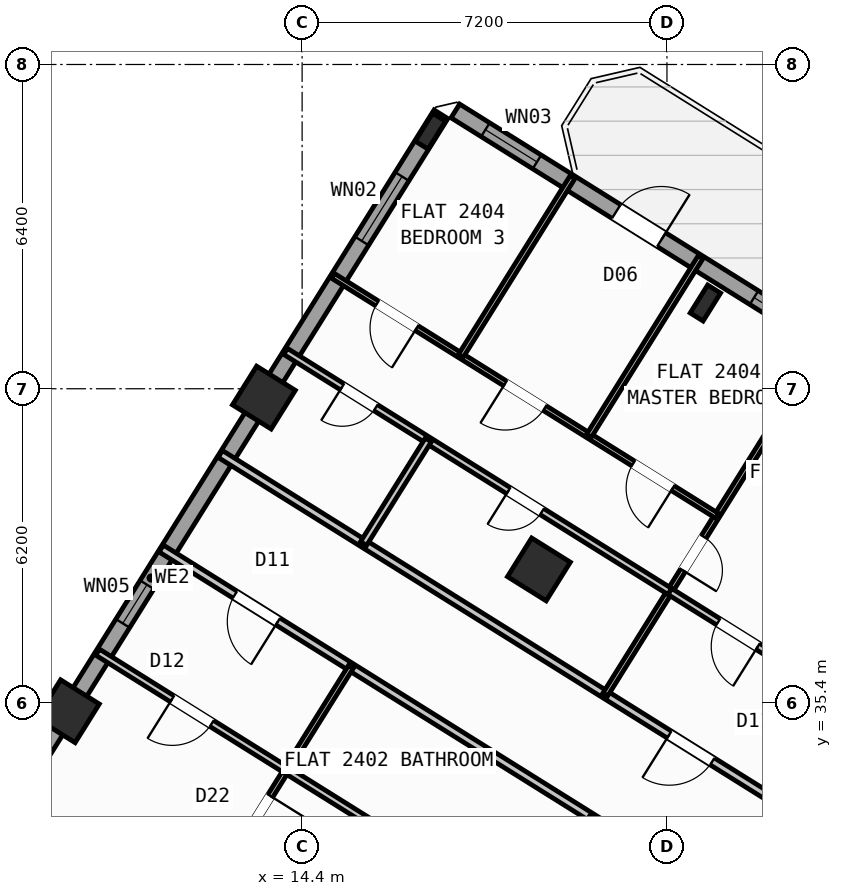
"""IFC4 building model, lengths in metres.
Left out: names, types, materials, properties, quantities, classifications, styles, units other than length and angle.
Written with IfcOpenShell. Run it as: python <this file> out.ifc"""

import sys

from ifc_helpers import new_model, si_unit, direction, frame, frame_2d, origin, origin_2d, place, context, subcontext, project, spatial, rectangle, hollow_rectangle, i_section, extrude, source, transform, mapped, element, fill, save


model = new_model("IFC4")
c1 = context("Model", 3, precision=1e-05, world=origin(), true_north=direction((0.0, 1.0)))
c2 = subcontext(c1, "Body", "Model", "MODEL_VIEW")
j1 = project(units=[si_unit("LENGTHUNIT", "METRE"), si_unit("PLANEANGLEUNIT", "RADIAN")], contexts=[c1])
p1 = place(None, origin())
s1 = spatial("IfcSite", under=j1, at=p1, CompositionType="ELEMENT")
p2 = place(p1, origin())
s2 = spatial("IfcBuilding", under=s1, at=p2, CompositionType="ELEMENT")
p3 = place(p2, frame((0.0, 0.0, 97.2)))
s3 = spatial("IfcBuildingStorey", under=s2, at=p3, CompositionType="ELEMENT", Elevation=97.2)
m1 = source(origin(), c2, "Body", "SweptSolid", [
    extrude(i_section(OverallWidth=0.3, OverallDepth=0.65, WebThickness=0.016, FlangeThickness=0.031, at=origin_2d()), origin(), (0.0, 0.0, 1.0), 3.6),
])
p4 = place(p3, frame((22.358, 43.292, 0.0), z_axis=(0.0, 0.0, 1.0), x_axis=(-0.848048096156, 0.529919264233, 0.0)))
e1 = element("IfcColumn", 1, at=p4, inside=s3, PredefinedType="COLUMN", context=c2, shape_type="MappedRepresentation", body=[
    mapped(m1, transform((0.0, 0.0, 0.0), scale=1.0)),
])
m2 = source(origin(), c2, "Body", "SweptSolid", [
    extrude(hollow_rectangle(XDim=0.9, YDim=0.9, WallThickness=0.036, at=origin_2d()), origin(), (0.0, 0.0, 1.0), 3.6),
])
p5 = place(p3, frame((19.073, 38.034, 0.0), z_axis=(0.0, 0.0, 1.0), x_axis=(-0.848048096156, 0.529919264233, 0.0)))
e2 = element("IfcColumn", 2, at=p5, inside=s3, PredefinedType="COLUMN", context=c2, shape_type="MappedRepresentation", body=[
    mapped(m2, transform((0.0, 0.0, 0.0), scale=1.0)),
])
p6 = place(p3, frame((16.931, 46.684, 0.0), z_axis=(0.0, 0.0, 1.0), x_axis=(-0.848048096156, 0.529919264233, 0.0)))
e3 = element("IfcColumn", 3, at=p6, inside=s3, PredefinedType="COLUMN", context=c2, shape_type="MappedRepresentation", body=[
    mapped(m1, transform((0.0, 0.0, 0.0), scale=1.0)),
])
for number, where, z_axis, x_axis in (
    (4, (13.646, 41.426, 0.0), (0.0, 0.0, 1.0), (-0.848, 0.53, 0.0)),
    (5, (9.777, 35.235, 0.0), (0.0, 0.0, 1.0), (-0.848, 0.53, 0.0)),
):
    element("IfcColumn", number, at=place(p3, frame(where, z_axis=z_axis, x_axis=x_axis)), inside=s3, PredefinedType="COLUMN", context=c2, shape_type="MappedRepresentation", body=[
        mapped(m2, transform((0.0, 0.0, 0.0), scale=1.0)),
    ])
p7 = place(p3, frame((5.7, 28.71, 0.0), z_axis=(0.0, 0.0, 1.0), x_axis=(0.529923711467, 0.8480453172, 0.0)))
e6 = element("IfcWall", 6, at=p7, inside=s3, PredefinedType="STANDARD", context=c2, shape_type="SweptSolid", body=[
    extrude(rectangle(XDim=21.587, YDim=0.32, at=frame_2d((10.794, 0.0))), origin(), (0.0, 0.0, 1.0), 2.745),
])
p8 = place(p7, frame((2.994, 0.0, 0.8)))
e7 = element("IfcOpeningElement", 7, at=p8, cuts=e6, PredefinedType="OPENING", context=c2, shape_type="SweptSolid", body=[
    extrude(rectangle(XDim=2.1, YDim=1.55, at=frame_2d((1.05, 0.775))), frame((0.0, 0.17, 0.0), z_axis=(0.0, -1.0, 0.0), x_axis=(1.0, 0.0, 0.0)), (0.0, 0.0, 1.0), 0.34),
])
p9 = place(p7, frame((9.739, 0.0, 1.0)))
e8 = element("IfcOpeningElement", 8, at=p9, cuts=e6, PredefinedType="OPENING", context=c2, shape_type="SweptSolid", body=[
    extrude(rectangle(XDim=0.9, YDim=1.25, at=frame_2d((0.45, 0.625))), frame((0.0, 0.17, 0.0), z_axis=(0.0, -1.0, 0.0), x_axis=(1.0, 0.0, 0.0)), (0.0, 0.0, 1.0), 0.34),
])
p10 = place(p7, frame((18.639, 0.0, 0.85)))
e9 = element("IfcOpeningElement", 9, at=p10, cuts=e6, PredefinedType="OPENING", context=c2, shape_type="SweptSolid", body=[
    extrude(rectangle(XDim=1.5, YDim=1.5, at=frame_2d((0.75, 0.75))), frame((0.0, 0.17, 0.0), z_axis=(0.0, -1.0, 0.0), x_axis=(1.0, 0.0, 0.0)), (0.0, 0.0, 1.0), 0.34),
])
p11 = place(p3, frame((17.424, 47.083, 0.0), z_axis=(0.0, 0.0, 1.0), x_axis=(0.848049927979, -0.529916332693, 0.0)))
e10 = element("IfcWall", 10, at=p11, inside=s3, PredefinedType="STANDARD", context=c2, shape_type="SweptSolid", body=[
    extrude(rectangle(XDim=29.223, YDim=0.32, at=frame_2d((14.612, 0.0))), origin(), (0.0, 0.0, 1.0), 3.32),
])
p12 = place(p11, frame((3.745, 0.0, 0.0)))
e11 = element("IfcOpeningElement", 11, at=p12, cuts=e10, PredefinedType="OPENING", context=c2, shape_type="SweptSolid", body=[
    extrude(rectangle(XDim=1.05, YDim=2.15, at=frame_2d((0.525, 1.075))), frame((0.0, 0.17, 0.0), z_axis=(0.0, -1.0, 0.0), x_axis=(1.0, 0.0, 0.0)), (0.0, 0.0, 1.0), 0.34),
])
p13 = place(p11, frame((0.699, 0.0, 0.95)))
e12 = element("IfcOpeningElement", 12, at=p13, cuts=e10, PredefinedType="OPENING", context=c2, shape_type="SweptSolid", body=[
    extrude(rectangle(XDim=1.2, YDim=1.4, at=frame_2d((0.6, 0.7))), frame((0.0, 0.17, 0.0), z_axis=(0.0, -1.0, 0.0), x_axis=(1.0, 0.0, 0.0)), (0.0, 0.0, 1.0), 0.34),
])
p14 = place(p11, frame((6.951, 0.0, 1.0)))
e13 = element("IfcOpeningElement", 13, at=p14, cuts=e10, PredefinedType="OPENING", context=c2, shape_type="SweptSolid", body=[
    extrude(rectangle(XDim=0.9, YDim=1.25, at=frame_2d((0.45, 0.625))), frame((0.0, 0.17, 0.0), z_axis=(0.0, -1.0, 0.0), x_axis=(1.0, 0.0, 0.0)), (0.0, 0.0, 1.0), 0.34),
])
p15 = place(p11, frame((9.841, 0.0, 0.85)))
e14 = element("IfcOpeningElement", 14, at=p15, cuts=e10, PredefinedType="OPENING", context=c2, shape_type="SweptSolid", body=[
    extrude(rectangle(XDim=1.5, YDim=1.5, at=frame_2d((0.75, 0.75))), frame((0.0, 0.17, 0.0), z_axis=(0.0, -1.0, 0.0), x_axis=(1.0, 0.0, 0.0)), (0.0, 0.0, 1.0), 0.34),
])
p16 = place(p11, frame((13.889, 0.0, 0.95)))
e15 = element("IfcOpeningElement", 15, at=p16, cuts=e10, PredefinedType="OPENING", context=c2, shape_type="SweptSolid", body=[
    extrude(rectangle(XDim=1.2, YDim=1.4, at=frame_2d((0.6, 0.7))), frame((0.0, 0.17, 0.0), z_axis=(0.0, -1.0, 0.0), x_axis=(1.0, 0.0, 0.0)), (0.0, 0.0, 1.0), 0.34),
])
p17 = place(p11, frame((17.254, 0.0, 1.0)))
e16 = element("IfcOpeningElement", 16, at=p17, cuts=e10, PredefinedType="OPENING", context=c2, shape_type="SweptSolid", body=[
    extrude(rectangle(XDim=0.9, YDim=1.25, at=frame_2d((0.45, 0.625))), frame((0.0, 0.17, 0.0), z_axis=(0.0, -1.0, 0.0), x_axis=(1.0, 0.0, 0.0)), (0.0, 0.0, 1.0), 0.34),
])
p18 = place(p11, frame((20.764, 0.0, 0.8)))
e17 = element("IfcOpeningElement", 17, at=p18, cuts=e10, PredefinedType="OPENING", context=c2, shape_type="SweptSolid", body=[
    extrude(rectangle(XDim=2.1, YDim=1.55, at=frame_2d((1.05, 0.775))), frame((0.0, 0.17, 0.0), z_axis=(0.0, -1.0, 0.0), x_axis=(1.0, 0.0, 0.0)), (0.0, 0.0, 1.0), 0.34),
])
p19 = place(p11, frame((25.403, 0.0, 0.8)))
e18 = element("IfcOpeningElement", 18, at=p19, cuts=e10, PredefinedType="OPENING", context=c2, shape_type="SweptSolid", body=[
    extrude(rectangle(XDim=2.1, YDim=1.55, at=frame_2d((1.05, 0.775))), frame((0.0, 0.17, 0.0), z_axis=(0.0, -1.0, 0.0), x_axis=(1.0, 0.0, 0.0)), (0.0, 0.0, 1.0), 0.34),
])
p20 = place(p3, frame((26.973, 31.447, 0.0), z_axis=(0.0, 0.0, 1.0), x_axis=(-0.848048310262, 0.529918921593, 0.0)))
e19 = element("IfcWall", 19, at=p20, inside=s3, PredefinedType="PARTITIONING", context=c2, shape_type="SweptSolid", body=[
    extrude(rectangle(XDim=16.73, YDim=0.16, at=frame_2d((8.365, 0.0))), origin(), (0.0, 0.0, 1.0), 3.31),
])
p21 = place(p20, frame((2.22, 0.0, 0.0)))
e20 = element("IfcOpeningElement", 20, at=p21, cuts=e19, PredefinedType="OPENING", context=c2, shape_type="SweptSolid", body=[
    extrude(rectangle(XDim=0.86, YDim=2.05, at=frame_2d((0.43, 1.025))), frame((0.0, 0.09, 0.0), z_axis=(0.0, -1.0, 0.0), x_axis=(1.0, 0.0, 0.0)), (0.0, 0.0, 1.0), 0.18),
])
p22 = place(p20, frame((5.28, 0.0, 0.0)))
e21 = element("IfcOpeningElement", 21, at=p22, cuts=e19, PredefinedType="OPENING", context=c2, shape_type="SweptSolid", body=[
    extrude(rectangle(XDim=1.0, YDim=2.1, at=frame_2d((0.5, 1.05))), frame((0.0, 0.09, 0.0), z_axis=(0.0, -1.0, 0.0), x_axis=(1.0, 0.0, 0.0)), (0.0, 0.0, 1.0), 0.18),
])
p23 = place(p3, frame((25.807, 29.582, 0.0), z_axis=(0.0, 0.0, 1.0), x_axis=(-0.848052408131, 0.529912363569, 0.0)))
e22 = element("IfcWall", 22, at=p23, inside=s3, PredefinedType="PARTITIONING", context=c2, shape_type="SweptSolid", body=[
    extrude(rectangle(XDim=16.73, YDim=0.16, at=frame_2d((8.365, 0.0))), origin(), (0.0, 0.0, 1.0), 3.31),
])
p24 = place(p23, frame((2.22, 0.0, 0.0)))
e23 = element("IfcOpeningElement", 23, at=p24, cuts=e22, PredefinedType="OPENING", context=c2, shape_type="SweptSolid", body=[
    extrude(rectangle(XDim=0.86, YDim=2.05, at=frame_2d((0.43, 1.025))), frame((0.0, 0.09, 0.0), z_axis=(0.0, -1.0, 0.0), x_axis=(1.0, 0.0, 0.0)), (0.0, 0.0, 1.0), 0.18),
])
p25 = place(p23, frame((14.013, 0.0, 0.0)))
e24 = element("IfcOpeningElement", 24, at=p25, cuts=e22, PredefinedType="OPENING", context=c2, shape_type="SweptSolid", body=[
    extrude(rectangle(XDim=1.0, YDim=2.1, at=frame_2d((0.5, 1.05))), frame((0.0, 0.09, 0.0), z_axis=(0.0, -1.0, 0.0), x_axis=(1.0, 0.0, 0.0)), (0.0, 0.0, 1.0), 0.18),
])
p26 = place(p3, frame((15.361, 36.108, 0.0), z_axis=(0.0, 0.0, 1.0), x_axis=(-0.529912802348, -0.848052133956, 0.0)))
e25 = element("IfcWall", 25, at=p26, inside=s3, PredefinedType="PARTITIONING", context=c2, shape_type="SweptSolid", body=[
    extrude(rectangle(XDim=11.72, YDim=0.11, at=frame_2d((5.86, 0.0))), origin(), (0.0, 0.0, 1.0), 2.935),
])
p27 = place(p26, frame((3.0, 0.0, 0.0)))
e26 = element("IfcOpeningElement", 26, at=p27, cuts=e25, PredefinedType="OPENING", context=c2, shape_type="SweptSolid", body=[
    extrude(rectangle(XDim=0.78, YDim=2.05, at=frame_2d((0.39, 1.025))), frame((0.0, 0.065, 0.0), z_axis=(0.0, -1.0, 0.0), x_axis=(1.0, 0.0, 0.0)), (0.0, 0.0, 1.0), 0.13),
])
p28 = place(p3, frame((14.09, 34.073, 0.0), z_axis=(0.0, 0.0, 1.0), x_axis=(-0.848045135007, 0.529924003034, 0.0)))
e27 = element("IfcWall", 27, at=p28, inside=s3, PredefinedType="PLUMBINGWALL", context=c2, shape_type="SweptSolid", body=[
    extrude(rectangle(XDim=4.393, YDim=0.14, at=frame_2d((2.196, 0.0))), origin(), (0.0, 0.0, 1.0), 3.31),
])
p29 = place(p28, frame((1.737, 0.0, 0.0)))
e28 = element("IfcOpeningElement", 28, at=p29, cuts=e27, PredefinedType="OPENING", context=c2, shape_type="SweptSolid", body=[
    extrude(rectangle(XDim=0.92, YDim=2.08, at=frame_2d((0.46, 1.04))), frame((0.0, 0.08, 0.0), z_axis=(0.0, -1.0, 0.0), x_axis=(1.0, 0.0, 0.0)), (0.0, 0.0, 1.0), 0.16),
])
p30 = place(p3, frame((21.321, 29.554, 0.0), z_axis=(0.0, 0.0, 1.0), x_axis=(-0.84803529765, 0.529939745575, 0.0)))
e29 = element("IfcWall", 29, at=p30, inside=s3, PredefinedType="PLUMBINGWALL", context=c2, shape_type="SweptSolid", body=[
    extrude(rectangle(XDim=8.527, YDim=0.14, at=frame_2d((4.264, 0.0))), origin(), (0.0, 0.0, 1.0), 3.31),
])
p31 = place(p30, frame((5.155, 0.0, 0.0)))
e30 = element("IfcOpeningElement", 30, at=p31, cuts=e29, PredefinedType="OPENING", context=c2, shape_type="SweptSolid", body=[
    extrude(rectangle(XDim=0.78, YDim=2.05, at=frame_2d((0.39, 1.025))), frame((0.0, 0.08, 0.0), z_axis=(0.0, -1.0, 0.0), x_axis=(1.0, 0.0, 0.0)), (0.0, 0.0, 1.0), 0.16),
])
p32 = place(p30, frame((1.011, 0.0, 0.0)))
e31 = element("IfcOpeningElement", 31, at=p32, cuts=e29, PredefinedType="OPENING", context=c2, shape_type="SweptSolid", body=[
    extrude(rectangle(XDim=0.78, YDim=2.05, at=frame_2d((0.39, 1.025))), frame((0.0, 0.08, 0.0), z_axis=(0.0, -1.0, 0.0), x_axis=(1.0, 0.0, 0.0)), (0.0, 0.0, 1.0), 0.16),
])
p33 = place(p3, frame((24.792, 42.62, 0.0), z_axis=(0.0, 0.0, 1.0), x_axis=(-0.529925083182, -0.848044460046, 0.0)))
e32 = element("IfcWall", 32, at=p33, inside=s3, PredefinedType="PARTITIONING", context=c2, shape_type="SweptSolid", body=[
    extrude(rectangle(XDim=8.32, YDim=0.11, at=frame_2d((4.16, 0.0))), origin(), (0.0, 0.0, 1.0), 3.31),
])
p34 = place(p33, frame((4.65, 0.0, 0.0)))
e33 = element("IfcOpeningElement", 33, at=p34, cuts=e32, PredefinedType="OPENING", context=c2, shape_type="SweptSolid", body=[
    extrude(rectangle(XDim=0.78, YDim=2.05, at=frame_2d((0.39, 1.025))), frame((0.0, 0.065, 0.0), z_axis=(0.0, -1.0, 0.0), x_axis=(1.0, 0.0, 0.0)), (0.0, 0.0, 1.0), 0.13),
])
p35 = place(p3, frame((25.03, 35.491, 0.0), z_axis=(0.0, 0.0, 1.0), x_axis=(-0.848070667369, 0.52988314103, 0.0)))
e34 = element("IfcWall", 34, at=p35, inside=s3, PredefinedType="PLUMBINGWALL", context=c2, shape_type="SweptSolid", body=[
    extrude(rectangle(XDim=3.98, YDim=0.14, at=frame_2d((1.99, 0.0))), origin(), (0.0, 0.0, 1.0), 3.31),
])
p36 = place(p35, frame((1.93, 0.0, 0.0)))
e35 = element("IfcOpeningElement", 35, at=p36, cuts=e34, PredefinedType="OPENING", context=c2, shape_type="SweptSolid", body=[
    extrude(rectangle(XDim=0.92, YDim=2.08, at=frame_2d((0.46, 1.04))), frame((0.0, 0.08, 0.0), z_axis=(0.0, -1.0, 0.0), x_axis=(1.0, 0.0, 0.0)), (0.0, 0.0, 1.0), 0.16),
])
p37 = place(p3, frame((21.655, 37.6, 0.0), z_axis=(0.0, 0.0, 1.0), x_axis=(-0.848044326704, 0.52992529657, 0.0)))
e36 = element("IfcWall", 36, at=p37, inside=s3, PredefinedType="PLUMBINGWALL", context=c2, shape_type="SweptSolid", body=[
    extrude(rectangle(XDim=8.94, YDim=0.14, at=frame_2d((4.47, 0.0))), origin(), (0.0, 0.0, 1.0), 3.31),
])
p38 = place(p37, frame((2.972, 0.0, 0.0)))
e37 = element("IfcOpeningElement", 37, at=p38, cuts=e36, PredefinedType="OPENING", context=c2, shape_type="SweptSolid", body=[
    extrude(rectangle(XDim=0.78, YDim=2.05, at=frame_2d((0.39, 1.025))), frame((0.0, 0.08, 0.0), z_axis=(0.0, -1.0, 0.0), x_axis=(1.0, 0.0, 0.0)), (0.0, 0.0, 1.0), 0.16),
])
p39 = place(p37, frame((6.843, 0.0, 0.0)))
e38 = element("IfcOpeningElement", 38, at=p39, cuts=e36, PredefinedType="OPENING", context=c2, shape_type="SweptSolid", body=[
    extrude(rectangle(XDim=0.78, YDim=2.05, at=frame_2d((0.39, 1.025))), frame((0.0, 0.08, 0.0), z_axis=(0.0, -1.0, 0.0), x_axis=(1.0, 0.0, 0.0)), (0.0, 0.0, 1.0), 0.16),
])
p40 = place(p3, frame((16.89, 40.589, 0.0), z_axis=(0.0, 0.0, 1.0), x_axis=(-0.52988967038, -0.848066587731, 0.0)))
e39 = element("IfcWall", 39, at=p40, inside=s3, PredefinedType="PLUMBINGWALL", context=c2, shape_type="SweptSolid", body=[
    extrude(rectangle(XDim=2.41, YDim=0.14, at=frame_2d((1.205, 0.0))), origin(), (0.0, 0.0, 1.0), 3.31),
])
p41 = place(p3, frame((22.588, 39.093, 0.0), z_axis=(0.0, 0.0, 1.0), x_axis=(-0.848044326704, 0.52992529657, 0.0)))
e40 = element("IfcWall", 40, at=p41, inside=s3, PredefinedType="PARTITIONING", context=c2, shape_type="SweptSolid", body=[
    extrude(rectangle(XDim=8.94, YDim=0.11, at=frame_2d((4.47, 0.0))), origin(), (0.0, 0.0, 1.0), 3.31),
])
p42 = place(p41, frame((1.03, 0.0, 0.0)))
e41 = element("IfcOpeningElement", 41, at=p42, cuts=e40, PredefinedType="OPENING", context=c2, shape_type="SweptSolid", body=[
    extrude(rectangle(XDim=0.92, YDim=2.08, at=frame_2d((0.46, 1.04))), frame((0.0, 0.065, 0.0), z_axis=(0.0, -1.0, 0.0), x_axis=(1.0, 0.0, 0.0)), (0.0, 0.0, 1.0), 0.13),
])
p43 = place(p41, frame((4.01, 0.0, 0.0)))
e42 = element("IfcOpeningElement", 42, at=p43, cuts=e40, PredefinedType="OPENING", context=c2, shape_type="SweptSolid", body=[
    extrude(rectangle(XDim=0.92, YDim=2.08, at=frame_2d((0.46, 1.04))), frame((0.0, 0.065, 0.0), z_axis=(0.0, -1.0, 0.0), x_axis=(1.0, 0.0, 0.0)), (0.0, 0.0, 1.0), 0.13),
])
p44 = place(p41, frame((6.99, 0.0, 0.0)))
e43 = element("IfcOpeningElement", 43, at=p44, cuts=e40, PredefinedType="OPENING", context=c2, shape_type="SweptSolid", body=[
    extrude(rectangle(XDim=0.92, YDim=2.08, at=frame_2d((0.46, 1.04))), frame((0.0, 0.065, 0.0), z_axis=(0.0, -1.0, 0.0), x_axis=(1.0, 0.0, 0.0)), (0.0, 0.0, 1.0), 0.13),
])
p45 = place(p3, frame((22.265, 44.199, 0.0), z_axis=(0.0, 0.0, 1.0), x_axis=(-0.529946186362, -0.848031272749, 0.0)))
e44 = element("IfcWall", 44, at=p45, inside=s3, PredefinedType="PARTITIONING", context=c2, shape_type="SweptSolid", body=[
    extrude(rectangle(XDim=4.16, YDim=0.11, at=frame_2d((2.08, 0.0))), origin(), (0.0, 0.0, 1.0), 3.31),
])
p46 = place(p3, frame((19.738, 45.779, 0.0), z_axis=(0.0, 0.0, 1.0), x_axis=(-0.529877605827, -0.848074125795, 0.0)))
e45 = element("IfcWall", 45, at=p46, inside=s3, PredefinedType="PARTITIONING", context=c2, shape_type="SweptSolid", body=[
    extrude(rectangle(XDim=4.16, YDim=0.11, at=frame_2d((2.08, 0.0))), origin(), (0.0, 0.0, 1.0), 3.31),
])
m3 = source(origin(), c2, "Body", "SweptSolid", [
    extrude(rectangle(XDim=1.05, YDim=2.15, at=frame_2d((0.525, 1.075))), frame((0.0, 0.025, 0.0), z_axis=(0.0, -1.0, 0.0), x_axis=(1.0, 0.0, 0.0)), (0.0, 0.0, 1.0), 0.05),
])
p47 = place(p12, origin())
e46 = element("IfcDoor", 46, at=p47, inside=s3, OperationType="SINGLE_SWING_RIGHT", PredefinedType="DOOR", context=c2, shape_type="MappedRepresentation", body=[
    mapped(m3, transform((0.0, 0.0, 0.0), scale=1.0)),
])
fill(e11, e46)
m4 = source(origin(), c2, "Body", "SweptSolid", [
    extrude(rectangle(XDim=0.9, YDim=1.25, at=frame_2d((0.45, 0.625))), frame((0.0, 0.03, 0.0), z_axis=(0.0, -1.0, 0.0), x_axis=(1.0, 0.0, 0.0)), (0.0, 0.0, 1.0), 0.06),
])
p48 = place(p9, origin())
e47 = element("IfcWindow", 47, at=p48, inside=s3, PartitioningType="SINGLE_PANEL", PredefinedType="WINDOW", context=c2, shape_type="MappedRepresentation", body=[
    mapped(m4, transform((0.0, 0.0, 0.0), scale=1.0)),
])
fill(e8, e47)
m5 = source(origin(), c2, "Body", "SweptSolid", [
    extrude(rectangle(XDim=1.5, YDim=1.5, at=frame_2d((0.75, 0.75))), frame((0.0, 0.03, 0.0), z_axis=(0.0, -1.0, 0.0), x_axis=(1.0, 0.0, 0.0)), (0.0, 0.0, 1.0), 0.06),
])
p49 = place(p10, origin())
e48 = element("IfcWindow", 48, at=p49, inside=s3, PartitioningType="SINGLE_PANEL", PredefinedType="WINDOW", context=c2, shape_type="MappedRepresentation", body=[
    mapped(m5, transform((0.0, 0.0, 0.0), scale=1.0)),
])
fill(e9, e48)
m6 = source(origin(), c2, "Body", "SweptSolid", [
    extrude(rectangle(XDim=1.2, YDim=1.4, at=frame_2d((0.6, 0.7))), frame((0.0, 0.03, 0.0), z_axis=(0.0, -1.0, 0.0), x_axis=(1.0, 0.0, 0.0)), (0.0, 0.0, 1.0), 0.06),
])
p50 = place(p13, origin())
e49 = element("IfcWindow", 49, at=p50, inside=s3, PartitioningType="SINGLE_PANEL", PredefinedType="WINDOW", context=c2, shape_type="MappedRepresentation", body=[
    mapped(m6, transform((0.0, 0.0, 0.0), scale=1.0)),
])
fill(e12, e49)
p51 = place(p14, origin())
e50 = element("IfcWindow", 50, at=p51, inside=s3, PartitioningType="SINGLE_PANEL", PredefinedType="WINDOW", context=c2, shape_type="MappedRepresentation", body=[
    mapped(m4, transform((0.0, 0.0, 0.0), scale=1.0)),
])
fill(e13, e50)
m7 = source(origin(), c2, "Body", "SweptSolid", [
    extrude(rectangle(XDim=1.0, YDim=2.1, at=frame_2d((0.5, 1.05))), frame((0.0, 0.025, 0.0), z_axis=(0.0, -1.0, 0.0), x_axis=(1.0, 0.0, 0.0)), (0.0, 0.0, 1.0), 0.05),
])
p52 = place(p25, origin())
e51 = element("IfcDoor", 51, at=p52, inside=s3, OperationType="SINGLE_SWING_LEFT", PredefinedType="DOOR", context=c2, shape_type="MappedRepresentation", body=[
    mapped(m7, transform((0.0, 0.0, 0.0), scale=1.0)),
])
fill(e24, e51)
m8 = source(origin(), c2, "Body", "SweptSolid", [
    extrude(rectangle(XDim=0.92, YDim=2.08, at=frame_2d((0.46, 1.04))), frame((0.0, 0.025, 0.0), z_axis=(0.0, -1.0, 0.0), x_axis=(1.0, 0.0, 0.0)), (0.0, 0.0, 1.0), 0.05),
])
p53 = place(p29, origin())
e52 = element("IfcDoor", 52, at=p53, inside=s3, OperationType="SINGLE_SWING_RIGHT", PredefinedType="DOOR", context=c2, shape_type="MappedRepresentation", body=[
    mapped(m8, transform((0.0, 0.0, 0.0), scale=1.0)),
])
fill(e28, e52)
m9 = source(origin(), c2, "Body", "SweptSolid", [
    extrude(rectangle(XDim=0.78, YDim=2.05, at=frame_2d((0.39, 1.025))), frame((0.0, 0.025, 0.0), z_axis=(0.0, -1.0, 0.0), x_axis=(1.0, 0.0, 0.0)), (0.0, 0.0, 1.0), 0.05),
])
p54 = place(p27, origin())
e53 = element("IfcDoor", 53, at=p54, inside=s3, OperationType="SINGLE_SWING_LEFT", PredefinedType="DOOR", context=c2, shape_type="MappedRepresentation", body=[
    mapped(m9, transform((0.0, 0.0, 0.0), scale=1.0)),
])
fill(e26, e53)
p55 = place(p22, origin())
e54 = element("IfcDoor", 54, at=p55, inside=s3, OperationType="SINGLE_SWING_RIGHT", PredefinedType="DOOR", context=c2, shape_type="MappedRepresentation", body=[
    mapped(m7, transform((0.0, 0.0, 0.0), scale=1.0)),
])
fill(e21, e54)
p56 = place(p36, origin())
e55 = element("IfcDoor", 55, at=p56, inside=s3, OperationType="SINGLE_SWING_LEFT", PredefinedType="DOOR", context=c2, shape_type="MappedRepresentation", body=[
    mapped(m8, transform((0.0, 0.0, 0.0), scale=1.0)),
])
fill(e35, e55)
p57 = place(p34, origin())
e56 = element("IfcDoor", 56, at=p57, inside=s3, OperationType="SINGLE_SWING_RIGHT", PredefinedType="DOOR", context=c2, shape_type="MappedRepresentation", body=[
    mapped(m9, transform((0.0, 0.0, 0.0), scale=1.0)),
])
fill(e33, e56)
p58 = place(p38, origin())
e57 = element("IfcDoor", 57, at=p58, inside=s3, OperationType="SINGLE_SWING_RIGHT", PredefinedType="DOOR", context=c2, shape_type="MappedRepresentation", body=[
    mapped(m9, transform((0.0, 0.0, 0.0), scale=1.0)),
])
fill(e37, e57)
p59 = place(p39, origin())
e58 = element("IfcDoor", 58, at=p59, inside=s3, OperationType="SINGLE_SWING_RIGHT", PredefinedType="DOOR", context=c2, shape_type="MappedRepresentation", body=[
    mapped(m9, transform((0.0, 0.0, 0.0), scale=1.0)),
])
fill(e38, e58)
p60 = place(p42, origin())
e59 = element("IfcDoor", 59, at=p60, inside=s3, OperationType="SINGLE_SWING_LEFT", PredefinedType="DOOR", context=c2, shape_type="MappedRepresentation", body=[
    mapped(m8, transform((0.0, 0.0, 0.0), scale=1.0)),
])
fill(e41, e59)
p61 = place(p43, origin())
e60 = element("IfcDoor", 60, at=p61, inside=s3, OperationType="SINGLE_SWING_RIGHT", PredefinedType="DOOR", context=c2, shape_type="MappedRepresentation", body=[
    mapped(m8, transform((0.0, 0.0, 0.0), scale=1.0)),
])
fill(e42, e60)
p62 = place(p44, origin())
e61 = element("IfcDoor", 61, at=p62, inside=s3, OperationType="SINGLE_SWING_LEFT", PredefinedType="DOOR", context=c2, shape_type="MappedRepresentation", body=[
    mapped(m8, transform((0.0, 0.0, 0.0), scale=1.0)),
])
fill(e43, e61)
save(model, sys.argv[1])
